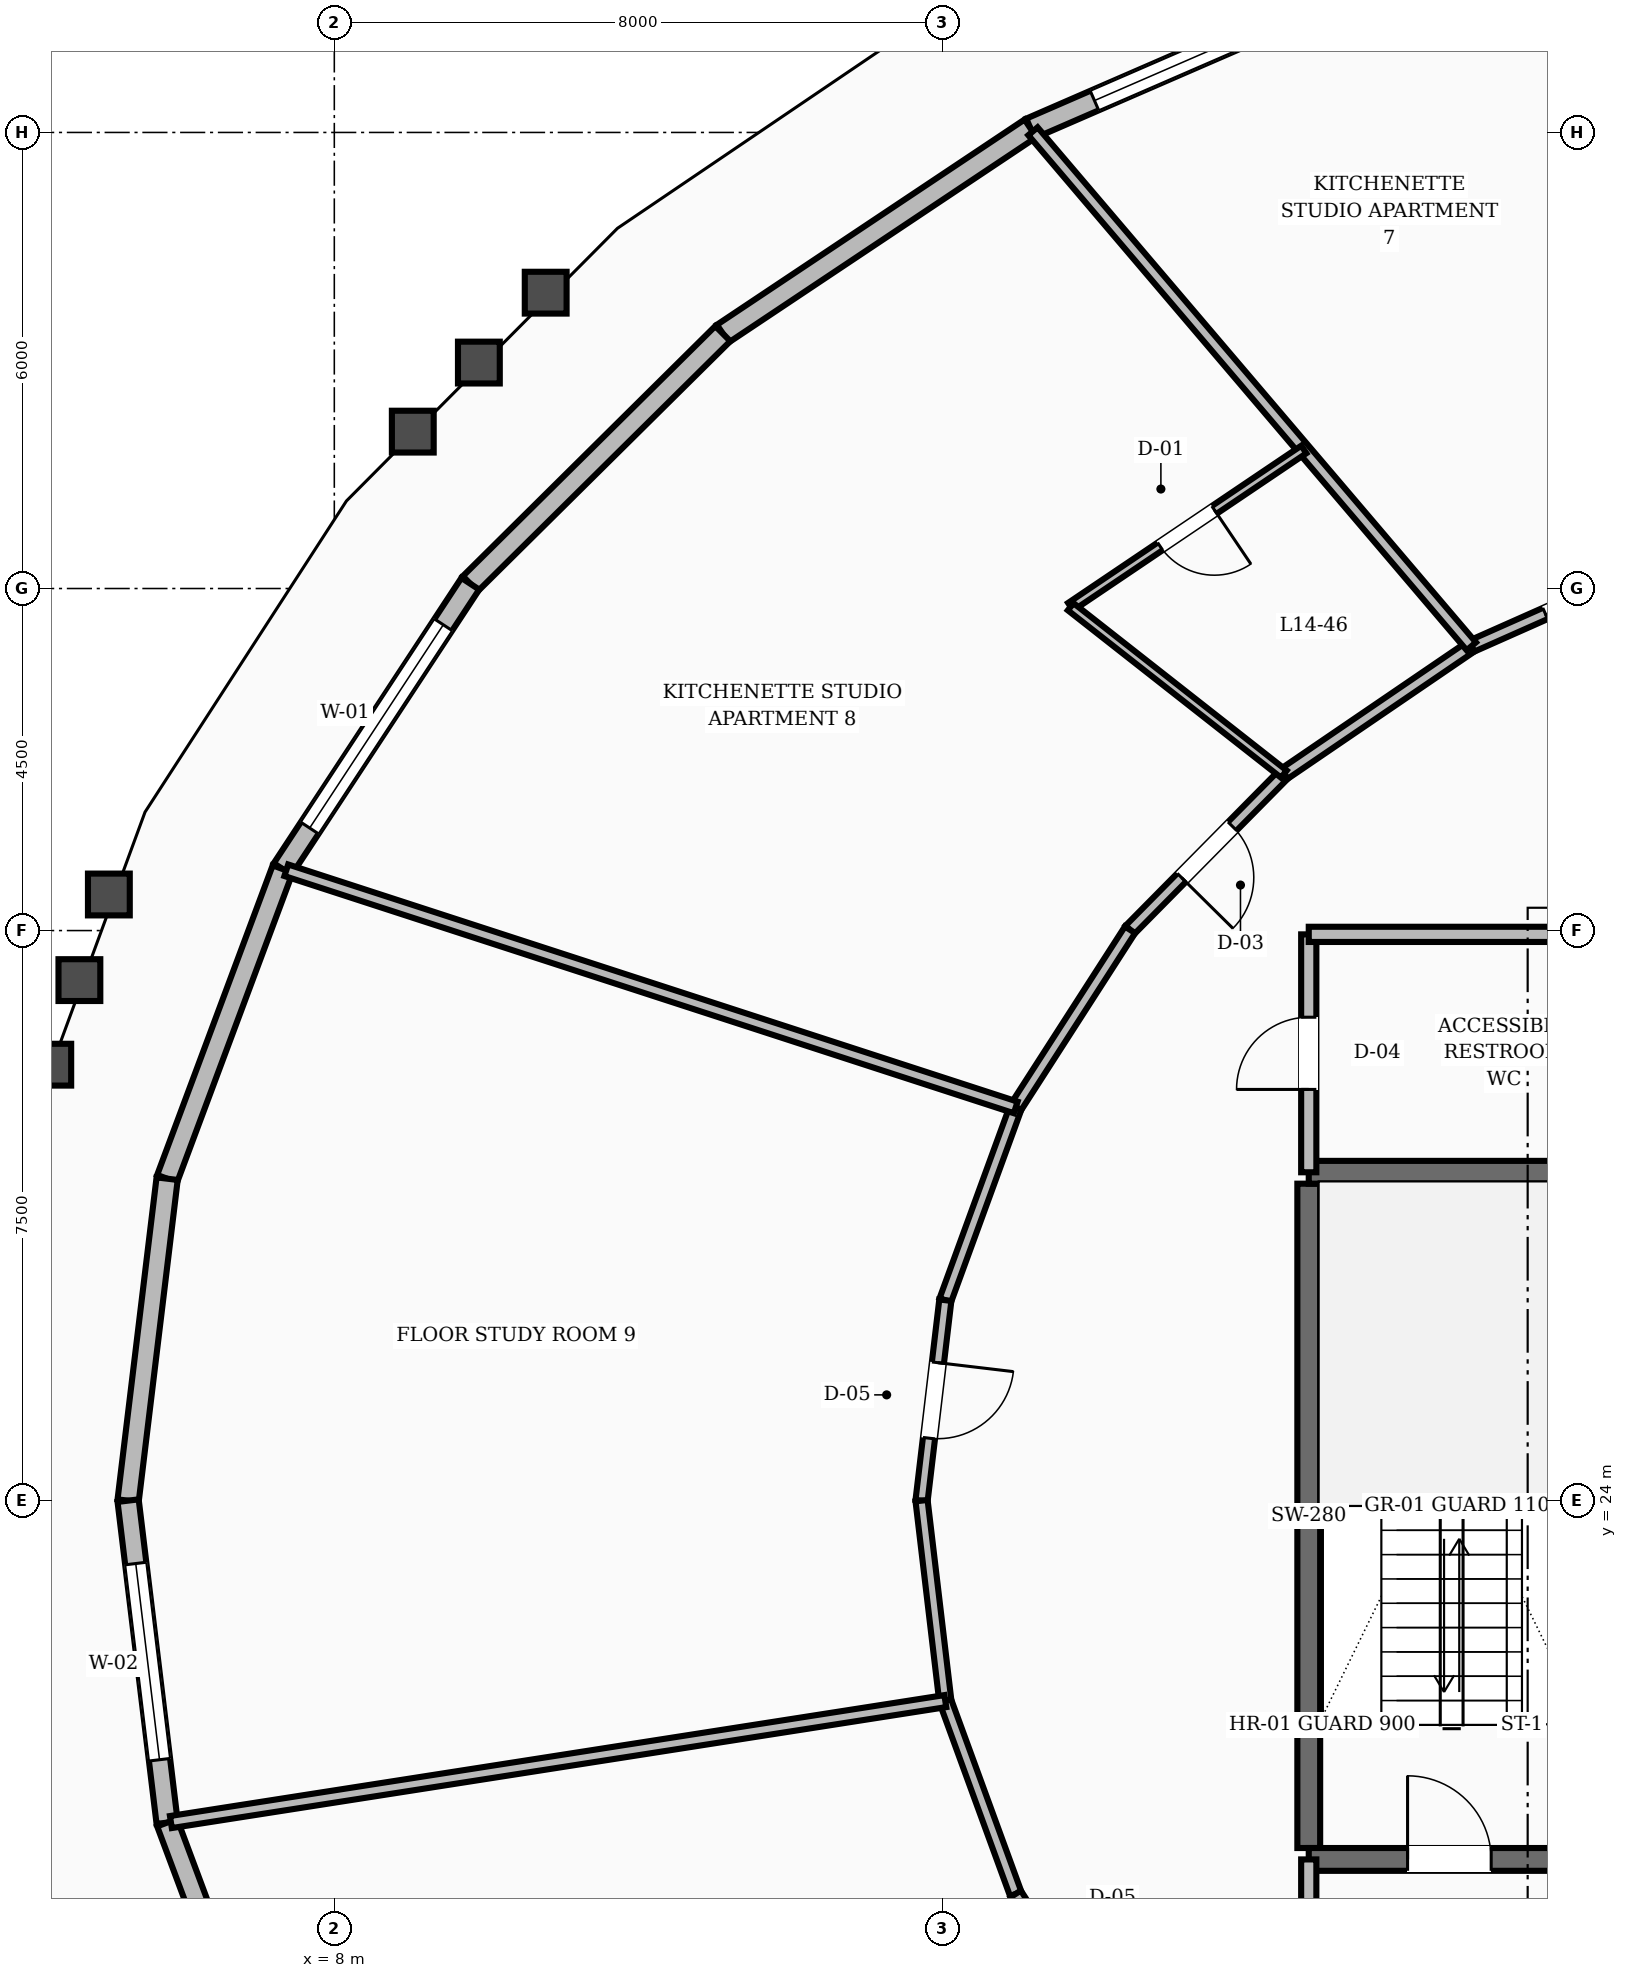
"""IFC4 building model, lengths in metres.
Left out: names, types, materials, properties, quantities, classifications, styles, units other than length and angle.
Written with IfcOpenShell. Run it as: python <this file> out.ifc"""

import sys

from ifc_helpers import new_model, si_unit, direction, frame, frame_2d, origin, place, context, subcontext, project, spatial, rectangle, extrude, element, fill, save


model = new_model("IFC4")
c1 = context("Model", 3, precision=1e-05, world=origin(), true_north=direction((0.0, 1.0)))
c2 = subcontext(c1, "Body", "Model", "MODEL_VIEW")
j1 = project(units=[si_unit("LENGTHUNIT", "METRE"), si_unit("PLANEANGLEUNIT", "RADIAN")], contexts=[c1])
p1 = place(None, origin())
s1 = spatial("IfcSite", under=j1, at=p1, CompositionType="ELEMENT")
p2 = place(p1, origin())
s2 = spatial("IfcBuilding", under=s1, at=p2, CompositionType="ELEMENT")
p3 = place(p2, frame((0.0, 0.0, 59.2)))
s3 = spatial("IfcBuildingStorey", under=s2, at=p3, CompositionType="ELEMENT", Elevation=59.2)
p4 = place(p3, frame((20.82, 19.43, 0.0), z_axis=(0.0, 0.0, 1.0), x_axis=(0.0, 1.0, 0.0)))
e1 = element("IfcWall", 1, at=p4, inside=s3, PredefinedType="SHEAR", context=c2, shape_type="SweptSolid", body=[
    extrude(rectangle(XDim=8.74, YDim=0.3, at=frame_2d((4.37, 0.0))), origin(), (0.0, 0.0, 1.0), 3.6),
])
p5 = place(p3, frame((20.82, 19.28, 0.0), z_axis=(0.0, 0.0, 1.0), x_axis=(1.0, 0.0, 0.0)))
e2 = element("IfcWall", 2, at=p5, inside=s3, PredefinedType="SHEAR", context=c2, shape_type="SweptSolid", body=[
    extrude(rectangle(XDim=3.6, YDim=0.3, at=frame_2d((1.8, 0.0))), origin(), (0.0, 0.0, 1.0), 3.6),
])
p6 = place(p5, frame((1.3, 0.0, 0.0)))
e3 = element("IfcOpeningElement", 3, at=p6, cuts=e2, PredefinedType="OPENING", context=c2, shape_type="SweptSolid", body=[
    extrude(rectangle(XDim=1.1, YDim=2.1, at=frame_2d((0.55, 1.05))), frame((0.0, 0.16, 0.0), z_axis=(0.0, -1.0, 0.0), x_axis=(1.0, 0.0, 0.0)), (0.0, 0.0, 1.0), 0.32),
])
p7 = place(p3, frame((20.82, 28.32, 0.0), z_axis=(0.0, 0.0, 1.0), x_axis=(1.0, 0.0, 0.0)))
e4 = element("IfcWall", 4, at=p7, inside=s3, PredefinedType="SHEAR", context=c2, shape_type="SweptSolid", body=[
    extrude(rectangle(XDim=3.6, YDim=0.3, at=frame_2d((1.8, 0.0))), origin(), (0.0, 0.0, 1.0), 3.6),
])
p8 = place(p3, frame((21.778, 44.06, 0.0), z_axis=(0.0, 0.0, 1.0), x_axis=(-0.917190263452, -0.398449520804, 0.0)))
e5 = element("IfcWall", 5, at=p8, inside=s3, PredefinedType="STANDARD", context=c2, shape_type="SweptSolid", body=[
    extrude(rectangle(XDim=5.035, YDim=0.28, at=frame_2d((2.518, 0.0))), origin(), (0.0, 0.0, 1.0), 2.65),
])
p9 = place(p8, frame((0.918, 0.0, 0.8)))
e6 = element("IfcOpeningElement", 6, at=p9, cuts=e5, PredefinedType="OPENING", context=c2, shape_type="SweptSolid", body=[
    extrude(rectangle(XDim=3.2, YDim=1.65, at=frame_2d((1.6, 0.825))), frame((0.0, 0.15, 0.0), z_axis=(0.0, -1.0, 0.0), x_axis=(1.0, 0.0, 0.0)), (0.0, 0.0, 1.0), 0.3),
])
p10 = place(p3, frame((17.159, 42.053, 0.0), z_axis=(0.0, 0.0, 1.0), x_axis=(-0.83189587854, -0.5549317501, 0.0)))
e7 = element("IfcWall", 7, at=p10, inside=s3, PredefinedType="STANDARD", context=c2, shape_type="SweptSolid", body=[
    extrude(rectangle(XDim=4.866, YDim=0.28, at=frame_2d((2.433, 0.0))), origin(), (0.0, 0.0, 1.0), 2.65),
])
p11 = place(p3, frame((13.111, 39.353, 0.0), z_axis=(0.0, 0.0, 1.0), x_axis=(-0.710492625766, -0.70370464595, 0.0)))
e8 = element("IfcWall", 8, at=p11, inside=s3, PredefinedType="STANDARD", context=c2, shape_type="SweptSolid", body=[
    extrude(rectangle(XDim=4.676, YDim=0.28, at=frame_2d((2.338, 0.0))), origin(), (0.0, 0.0, 1.0), 2.65),
])
p12 = place(p3, frame((9.789, 36.063, 0.0), z_axis=(0.0, 0.0, 1.0), x_axis=(-0.549434846356, -0.835536563898, 0.0)))
e9 = element("IfcWall", 9, at=p12, inside=s3, PredefinedType="STANDARD", context=c2, shape_type="SweptSolid", body=[
    extrude(rectangle(XDim=4.493, YDim=0.28, at=frame_2d((2.247, 0.0))), origin(), (0.0, 0.0, 1.0), 2.65),
])
p13 = place(p12, frame((0.646, 0.0, 0.8)))
e10 = element("IfcOpeningElement", 10, at=p13, cuts=e9, PredefinedType="OPENING", context=c2, shape_type="SweptSolid", body=[
    extrude(rectangle(XDim=3.2, YDim=1.65, at=frame_2d((1.6, 0.825))), frame((0.0, 0.15, 0.0), z_axis=(0.0, -1.0, 0.0), x_axis=(1.0, 0.0, 0.0)), (0.0, 0.0, 1.0), 0.3),
])
p14 = place(p3, frame((7.321, 32.309, 0.0), z_axis=(0.0, 0.0, 1.0), x_axis=(-0.349670708584, -0.93687266774, 0.0)))
e11 = element("IfcWall", 11, at=p14, inside=s3, PredefinedType="STANDARD", context=c2, shape_type="SweptSolid", body=[
    extrude(rectangle(XDim=4.348, YDim=0.28, at=frame_2d((2.174, 0.0))), origin(), (0.0, 0.0, 1.0), 2.65),
])
p15 = place(p3, frame((5.801, 28.236, 0.0), z_axis=(0.0, 0.0, 1.0), x_axis=(-0.120273268537, -0.992740822609, 0.0)))
e12 = element("IfcWall", 12, at=p15, inside=s3, PredefinedType="STANDARD", context=c2, shape_type="SweptSolid", body=[
    extrude(rectangle(XDim=4.267, YDim=0.28, at=frame_2d((2.133, 0.0))), origin(), (0.0, 0.0, 1.0), 2.65),
])
p16 = place(p3, frame((5.287, 24.0, 0.0), z_axis=(0.0, 0.0, 1.0), x_axis=(0.120273268537, -0.992740822609, 0.0)))
e13 = element("IfcWall", 13, at=p16, inside=s3, PredefinedType="STANDARD", context=c2, shape_type="SweptSolid", body=[
    extrude(rectangle(XDim=4.267, YDim=0.28, at=frame_2d((2.133, 0.0))), origin(), (0.0, 0.0, 1.0), 2.65),
])
p17 = place(p16, frame((0.833, 0.0, 0.8)))
e14 = element("IfcOpeningElement", 14, at=p17, cuts=e13, PredefinedType="OPENING", context=c2, shape_type="SweptSolid", body=[
    extrude(rectangle(XDim=2.6, YDim=1.65, at=frame_2d((1.3, 0.825))), frame((0.0, 0.15, 0.0), z_axis=(0.0, -1.0, 0.0), x_axis=(1.0, 0.0, 0.0)), (0.0, 0.0, 1.0), 0.3),
])
p18 = place(p3, frame((5.801, 19.764, 0.0), z_axis=(0.0, 0.0, 1.0), x_axis=(0.349670708584, -0.93687266774, 0.0)))
e15 = element("IfcWall", 15, at=p18, inside=s3, PredefinedType="STANDARD", context=c2, shape_type="SweptSolid", body=[
    extrude(rectangle(XDim=4.348, YDim=0.28, at=frame_2d((2.174, 0.0))), origin(), (0.0, 0.0, 1.0), 2.65),
])
p19 = place(p3, frame((20.82, 16.55, 0.0), z_axis=(0.0, 0.0, 1.0), x_axis=(0.0, 1.0, 0.0)))
e16 = element("IfcWall", 16, at=p19, inside=s3, PredefinedType="SOLIDWALL", context=c2, shape_type="SweptSolid", body=[
    extrude(rectangle(XDim=2.73, YDim=0.2, at=frame_2d((1.365, 0.0))), origin(), (0.0, 0.0, 1.0), 2.61),
])
p20 = place(p19, frame((0.815, 0.0, 0.0)))
e17 = element("IfcOpeningElement", 17, at=p20, cuts=e16, PredefinedType="OPENING", context=c2, shape_type="SweptSolid", body=[
    extrude(rectangle(XDim=1.1, YDim=2.1, at=frame_2d((0.55, 1.05))), frame((0.0, 0.11, 0.0), z_axis=(0.0, -1.0, 0.0), x_axis=(1.0, 0.0, 0.0)), (0.0, 0.0, 1.0), 0.22),
])
p21 = place(p3, frame((20.82, 28.32, 0.0), z_axis=(0.0, 0.0, 1.0), x_axis=(0.0, 1.0, 0.0)))
e18 = element("IfcWall", 18, at=p21, inside=s3, PredefinedType="SOLIDWALL", context=c2, shape_type="SweptSolid", body=[
    extrude(rectangle(XDim=3.13, YDim=0.2, at=frame_2d((1.565, 0.0))), origin(), (0.0, 0.0, 1.0), 2.61),
])
p22 = place(p21, frame((1.09, 0.0, 0.0)))
e19 = element("IfcOpeningElement", 19, at=p22, cuts=e18, PredefinedType="OPENING", context=c2, shape_type="SweptSolid", body=[
    extrude(rectangle(XDim=0.95, YDim=2.1, at=frame_2d((0.475, 1.05))), frame((0.0, 0.11, 0.0), z_axis=(0.0, -1.0, 0.0), x_axis=(1.0, 0.0, 0.0)), (0.0, 0.0, 1.0), 0.22),
])
p23 = place(p3, frame((20.82, 31.45, 0.0), z_axis=(0.0, 0.0, 1.0), x_axis=(1.0, 0.0, 0.0)))
e20 = element("IfcWall", 20, at=p23, inside=s3, PredefinedType="SOLIDWALL", context=c2, shape_type="SweptSolid", body=[
    extrude(rectangle(XDim=3.98, YDim=0.2, at=frame_2d((1.99, 0.0))), origin(), (0.0, 0.0, 1.0), 2.61),
])
p24 = place(p3, frame((25.772, 36.489, 0.0), z_axis=(0.0, 0.0, 1.0), x_axis=(-0.913952123493, -0.405822024984, 0.0)))
e21 = element("IfcWall", 21, at=p24, inside=s3, PredefinedType="SOLIDWALL", context=c2, shape_type="SweptSolid", body=[
    extrude(rectangle(XDim=3.078, YDim=0.16, at=frame_2d((1.539, 0.0))), origin(), (0.0, 0.0, 1.0), 2.61),
])
p25 = place(p24, frame((1.064, 0.0, 0.0)))
e22 = element("IfcOpeningElement", 22, at=p25, cuts=e21, PredefinedType="OPENING", context=c2, shape_type="SweptSolid", body=[
    extrude(rectangle(XDim=0.95, YDim=2.1, at=frame_2d((0.475, 1.05))), frame((0.0, 0.09, 0.0), z_axis=(0.0, -1.0, 0.0), x_axis=(1.0, 0.0, 0.0)), (0.0, 0.0, 1.0), 0.18),
])
p26 = place(p3, frame((22.959, 35.24, 0.0), z_axis=(0.0, 0.0, 1.0), x_axis=(-0.826293096206, -0.56324037423, 0.0)))
e23 = element("IfcWall", 23, at=p26, inside=s3, PredefinedType="SOLIDWALL", context=c2, shape_type="SweptSolid", body=[
    extrude(rectangle(XDim=2.985, YDim=0.16, at=frame_2d((1.492, 0.0))), origin(), (0.0, 0.0, 1.0), 2.61),
])
p27 = place(p3, frame((20.492, 33.559, 0.0), z_axis=(0.0, 0.0, 1.0), x_axis=(-0.702811997, -0.711375636969, 0.0)))
e24 = element("IfcWall", 24, at=p27, inside=s3, PredefinedType="SOLIDWALL", context=c2, shape_type="SweptSolid", body=[
    extrude(rectangle(XDim=2.879, YDim=0.16, at=frame_2d((1.44, 0.0))), origin(), (0.0, 0.0, 1.0), 2.61),
])
p28 = place(p27, frame((0.965, 0.0, 0.0)))
e25 = element("IfcOpeningElement", 25, at=p28, cuts=e24, PredefinedType="OPENING", context=c2, shape_type="SweptSolid", body=[
    extrude(rectangle(XDim=0.95, YDim=2.1, at=frame_2d((0.475, 1.05))), frame((0.0, 0.09, 0.0), z_axis=(0.0, -1.0, 0.0), x_axis=(1.0, 0.0, 0.0)), (0.0, 0.0, 1.0), 0.18),
])
p29 = place(p3, frame((18.469, 31.51, 0.0), z_axis=(0.0, 0.0, 1.0), x_axis=(-0.541126045017, -0.840941498206, 0.0)))
e26 = element("IfcWall", 26, at=p29, inside=s3, PredefinedType="SOLIDWALL", context=c2, shape_type="SweptSolid", body=[
    extrude(rectangle(XDim=2.779, YDim=0.16, at=frame_2d((1.39, 0.0))), origin(), (0.0, 0.0, 1.0), 2.61),
])
p30 = place(p3, frame((16.965, 29.173, 0.0), z_axis=(0.0, 0.0, 1.0), x_axis=(-0.343013437329, -0.939330496583, 0.0)))
e27 = element("IfcWall", 27, at=p30, inside=s3, PredefinedType="SOLIDWALL", context=c2, shape_type="SweptSolid", body=[
    extrude(rectangle(XDim=2.7, YDim=0.16, at=frame_2d((1.35, 0.0))), origin(), (0.0, 0.0, 1.0), 2.61),
])
p31 = place(p3, frame((16.039, 26.637, 0.0), z_axis=(0.0, 0.0, 1.0), x_axis=(-0.117763961213, -0.99304161516, 0.0)))
e28 = element("IfcWall", 28, at=p31, inside=s3, PredefinedType="SOLIDWALL", context=c2, shape_type="SweptSolid", body=[
    extrude(rectangle(XDim=2.656, YDim=0.16, at=frame_2d((1.328, 0.0))), origin(), (0.0, 0.0, 1.0), 2.61),
])
p32 = place(p31, frame((0.828, 0.0, 0.0)))
e29 = element("IfcOpeningElement", 29, at=p32, cuts=e28, PredefinedType="OPENING", context=c2, shape_type="SweptSolid", body=[
    extrude(rectangle(XDim=1.0, YDim=2.1, at=frame_2d((0.5, 1.05))), frame((0.0, 0.09, 0.0), z_axis=(0.0, -1.0, 0.0), x_axis=(1.0, 0.0, 0.0)), (0.0, 0.0, 1.0), 0.18),
])
p33 = place(p3, frame((15.726, 24.0, 0.0), z_axis=(0.0, 0.0, 1.0), x_axis=(0.117763961213, -0.99304161516, 0.0)))
e30 = element("IfcWall", 30, at=p33, inside=s3, PredefinedType="SOLIDWALL", context=c2, shape_type="SweptSolid", body=[
    extrude(rectangle(XDim=2.656, YDim=0.16, at=frame_2d((1.328, 0.0))), origin(), (0.0, 0.0, 1.0), 2.61),
])
p34 = place(p3, frame((16.039, 21.363, 0.0), z_axis=(0.0, 0.0, 1.0), x_axis=(0.343013437329, -0.939330496583, 0.0)))
e31 = element("IfcWall", 31, at=p34, inside=s3, PredefinedType="SOLIDWALL", context=c2, shape_type="SweptSolid", body=[
    extrude(rectangle(XDim=2.7, YDim=0.16, at=frame_2d((1.35, 0.0))), origin(), (0.0, 0.0, 1.0), 2.61),
])
p35 = place(p3, frame((16.965, 18.827, 0.0), z_axis=(0.0, 0.0, 1.0), x_axis=(0.541126045017, -0.840941498206, 0.0)))
e32 = element("IfcWall", 32, at=p35, inside=s3, PredefinedType="SOLIDWALL", context=c2, shape_type="SweptSolid", body=[
    extrude(rectangle(XDim=2.779, YDim=0.16, at=frame_2d((1.39, 0.0))), origin(), (0.0, 0.0, 1.0), 2.61),
])
p36 = place(p35, frame((0.89, 0.0, 0.0)))
e33 = element("IfcOpeningElement", 33, at=p36, cuts=e32, PredefinedType="OPENING", context=c2, shape_type="SweptSolid", body=[
    extrude(rectangle(XDim=1.0, YDim=2.1, at=frame_2d((0.5, 1.05))), frame((0.0, 0.09, 0.0), z_axis=(0.0, -1.0, 0.0), x_axis=(1.0, 0.0, 0.0)), (0.0, 0.0, 1.0), 0.18),
])
p37 = place(p3, frame((22.959, 35.24, 0.0), z_axis=(0.0, 0.0, 1.0), x_axis=(-0.648157225864, 0.761506540064, 0.0)))
e34 = element("IfcWall", 34, at=p37, inside=s3, PredefinedType="SOLIDWALL", context=c2, shape_type="SweptSolid", body=[
    extrude(rectangle(XDim=8.898, YDim=0.16, at=frame_2d((4.449, 0.0))), origin(), (0.0, 0.0, 1.0), 2.61),
])
p38 = place(p3, frame((20.755, 37.829, 0.0), z_axis=(0.0, 0.0, 1.0), x_axis=(-0.829084222504, -0.559123735854, 0.0)))
e35 = element("IfcWall", 35, at=p38, inside=s3, PredefinedType="PARTITIONING", context=c2, shape_type="SweptSolid", body=[
    extrude(rectangle(XDim=3.7, YDim=0.12, at=frame_2d((1.85, 0.0))), origin(), (0.0, 0.0, 1.0), 2.61),
])
p39 = place(p38, frame((1.42, 0.0, 0.0)))
e36 = element("IfcOpeningElement", 36, at=p39, cuts=e35, PredefinedType="OPENING", context=c2, shape_type="SweptSolid", body=[
    extrude(rectangle(XDim=0.86, YDim=2.1, at=frame_2d((0.43, 1.05))), frame((0.0, 0.07, 0.0), z_axis=(0.0, -1.0, 0.0), x_axis=(1.0, 0.0, 0.0)), (0.0, 0.0, 1.0), 0.14),
])
p40 = place(p3, frame((20.492, 33.559, 0.0), z_axis=(0.0, 0.0, 1.0), x_axis=(-0.786586722527, 0.617479819868, 0.0)))
e37 = element("IfcWall", 37, at=p40, inside=s3, PredefinedType="PARTITIONING", context=c2, shape_type="SweptSolid", body=[
    extrude(rectangle(XDim=3.566, YDim=0.12, at=frame_2d((1.783, 0.0))), origin(), (0.0, 0.0, 1.0), 2.61),
])
p41 = place(p3, frame((16.965, 29.173, 0.0), z_axis=(0.0, 0.0, 1.0), x_axis=(-0.950984986604, 0.309237053495, 0.0)))
e38 = element("IfcWall", 38, at=p41, inside=s3, PredefinedType="SOLIDWALL", context=c2, shape_type="SweptSolid", body=[
    extrude(rectangle(XDim=10.091, YDim=0.16, at=frame_2d((5.046, 0.0))), origin(), (0.0, 0.0, 1.0), 2.61),
])
p42 = place(p3, frame((16.039, 21.363, 0.0), z_axis=(0.0, 0.0, 1.0), x_axis=(-0.988025684157, -0.154289492336, 0.0)))
e39 = element("IfcWall", 39, at=p42, inside=s3, PredefinedType="SOLIDWALL", context=c2, shape_type="SweptSolid", body=[
    extrude(rectangle(XDim=10.312, YDim=0.16, at=frame_2d((5.156, 0.0))), origin(), (0.0, 0.0, 1.0), 2.61),
])
p43 = place(p9, origin())
e40 = element("IfcWindow", 40, at=p43, inside=s3, PartitioningType="SINGLE_PANEL", PredefinedType="WINDOW", context=c2, shape_type="SweptSolid", body=[
    extrude(rectangle(XDim=3.2, YDim=1.65, at=frame_2d((1.6, 0.825))), frame((0.0, 0.03, 0.0), z_axis=(0.0, -1.0, 0.0), x_axis=(1.0, 0.0, 0.0)), (0.0, 0.0, 1.0), 0.06),
])
fill(e6, e40)
p44 = place(p13, origin())
e41 = element("IfcWindow", 41, at=p44, inside=s3, PartitioningType="SINGLE_PANEL", PredefinedType="WINDOW", context=c2, shape_type="SweptSolid", body=[
    extrude(rectangle(XDim=3.2, YDim=1.65, at=frame_2d((1.6, 0.825))), frame((0.0, 0.03, 0.0), z_axis=(0.0, -1.0, 0.0), x_axis=(1.0, 0.0, 0.0)), (0.0, 0.0, 1.0), 0.06),
])
fill(e10, e41)
p45 = place(p17, origin())
e42 = element("IfcWindow", 42, at=p45, inside=s3, PartitioningType="SINGLE_PANEL", PredefinedType="WINDOW", context=c2, shape_type="SweptSolid", body=[
    extrude(rectangle(XDim=2.6, YDim=1.65, at=frame_2d((1.3, 0.825))), frame((0.0, 0.03, 0.0), z_axis=(0.0, -1.0, 0.0), x_axis=(1.0, 0.0, 0.0)), (0.0, 0.0, 1.0), 0.06),
])
fill(e14, e42)
p46 = place(p6, origin())
e43 = element("IfcDoor", 43, at=p46, inside=s3, OperationType="SINGLE_SWING_LEFT", PredefinedType="DOOR", context=c2, shape_type="SweptSolid", body=[
    extrude(rectangle(XDim=1.1, YDim=2.1, at=frame_2d((0.55, 1.05))), frame((0.0, 0.025, 0.0), z_axis=(0.0, -1.0, 0.0), x_axis=(1.0, 0.0, 0.0)), (0.0, 0.0, 1.0), 0.05),
])
fill(e3, e43)
p47 = place(p22, origin())
e44 = element("IfcDoor", 44, at=p47, inside=s3, OperationType="SINGLE_SWING_LEFT", PredefinedType="DOOR", context=c2, shape_type="SweptSolid", body=[
    extrude(rectangle(XDim=0.95, YDim=2.1, at=frame_2d((0.475, 1.05))), frame((0.0, 0.025, 0.0), z_axis=(0.0, -1.0, 0.0), x_axis=(1.0, 0.0, 0.0)), (0.0, 0.0, 1.0), 0.05),
])
fill(e19, e44)
p48 = place(p25, origin())
e45 = element("IfcDoor", 45, at=p48, inside=s3, OperationType="SINGLE_SWING_RIGHT", PredefinedType="DOOR", context=c2, shape_type="SweptSolid", body=[
    extrude(rectangle(XDim=0.95, YDim=2.1, at=frame_2d((0.475, 1.05))), frame((0.0, 0.025, 0.0), z_axis=(0.0, -1.0, 0.0), x_axis=(1.0, 0.0, 0.0)), (0.0, 0.0, 1.0), 0.05),
])
fill(e22, e45)
p49 = place(p39, origin())
e46 = element("IfcDoor", 46, at=p49, inside=s3, OperationType="SINGLE_SWING_LEFT", PredefinedType="DOOR", context=c2, shape_type="SweptSolid", body=[
    extrude(rectangle(XDim=0.86, YDim=2.1, at=frame_2d((0.43, 1.05))), frame((0.0, 0.025, 0.0), z_axis=(0.0, -1.0, 0.0), x_axis=(1.0, 0.0, 0.0)), (0.0, 0.0, 1.0), 0.05),
])
fill(e36, e46)
p50 = place(p28, origin())
e47 = element("IfcDoor", 47, at=p50, inside=s3, OperationType="SINGLE_SWING_RIGHT", PredefinedType="DOOR", context=c2, shape_type="SweptSolid", body=[
    extrude(rectangle(XDim=0.95, YDim=2.1, at=frame_2d((0.475, 1.05))), frame((0.0, 0.025, 0.0), z_axis=(0.0, -1.0, 0.0), x_axis=(1.0, 0.0, 0.0)), (0.0, 0.0, 1.0), 0.05),
])
fill(e25, e47)
p51 = place(p32, origin())
e48 = element("IfcDoor", 48, at=p51, inside=s3, OperationType="SINGLE_SWING_LEFT", PredefinedType="DOOR", context=c2, shape_type="SweptSolid", body=[
    extrude(rectangle(XDim=1.0, YDim=2.1, at=frame_2d((0.5, 1.05))), frame((0.0, 0.025, 0.0), z_axis=(0.0, -1.0, 0.0), x_axis=(1.0, 0.0, 0.0)), (0.0, 0.0, 1.0), 0.05),
])
fill(e29, e48)
save(model, sys.argv[1])
